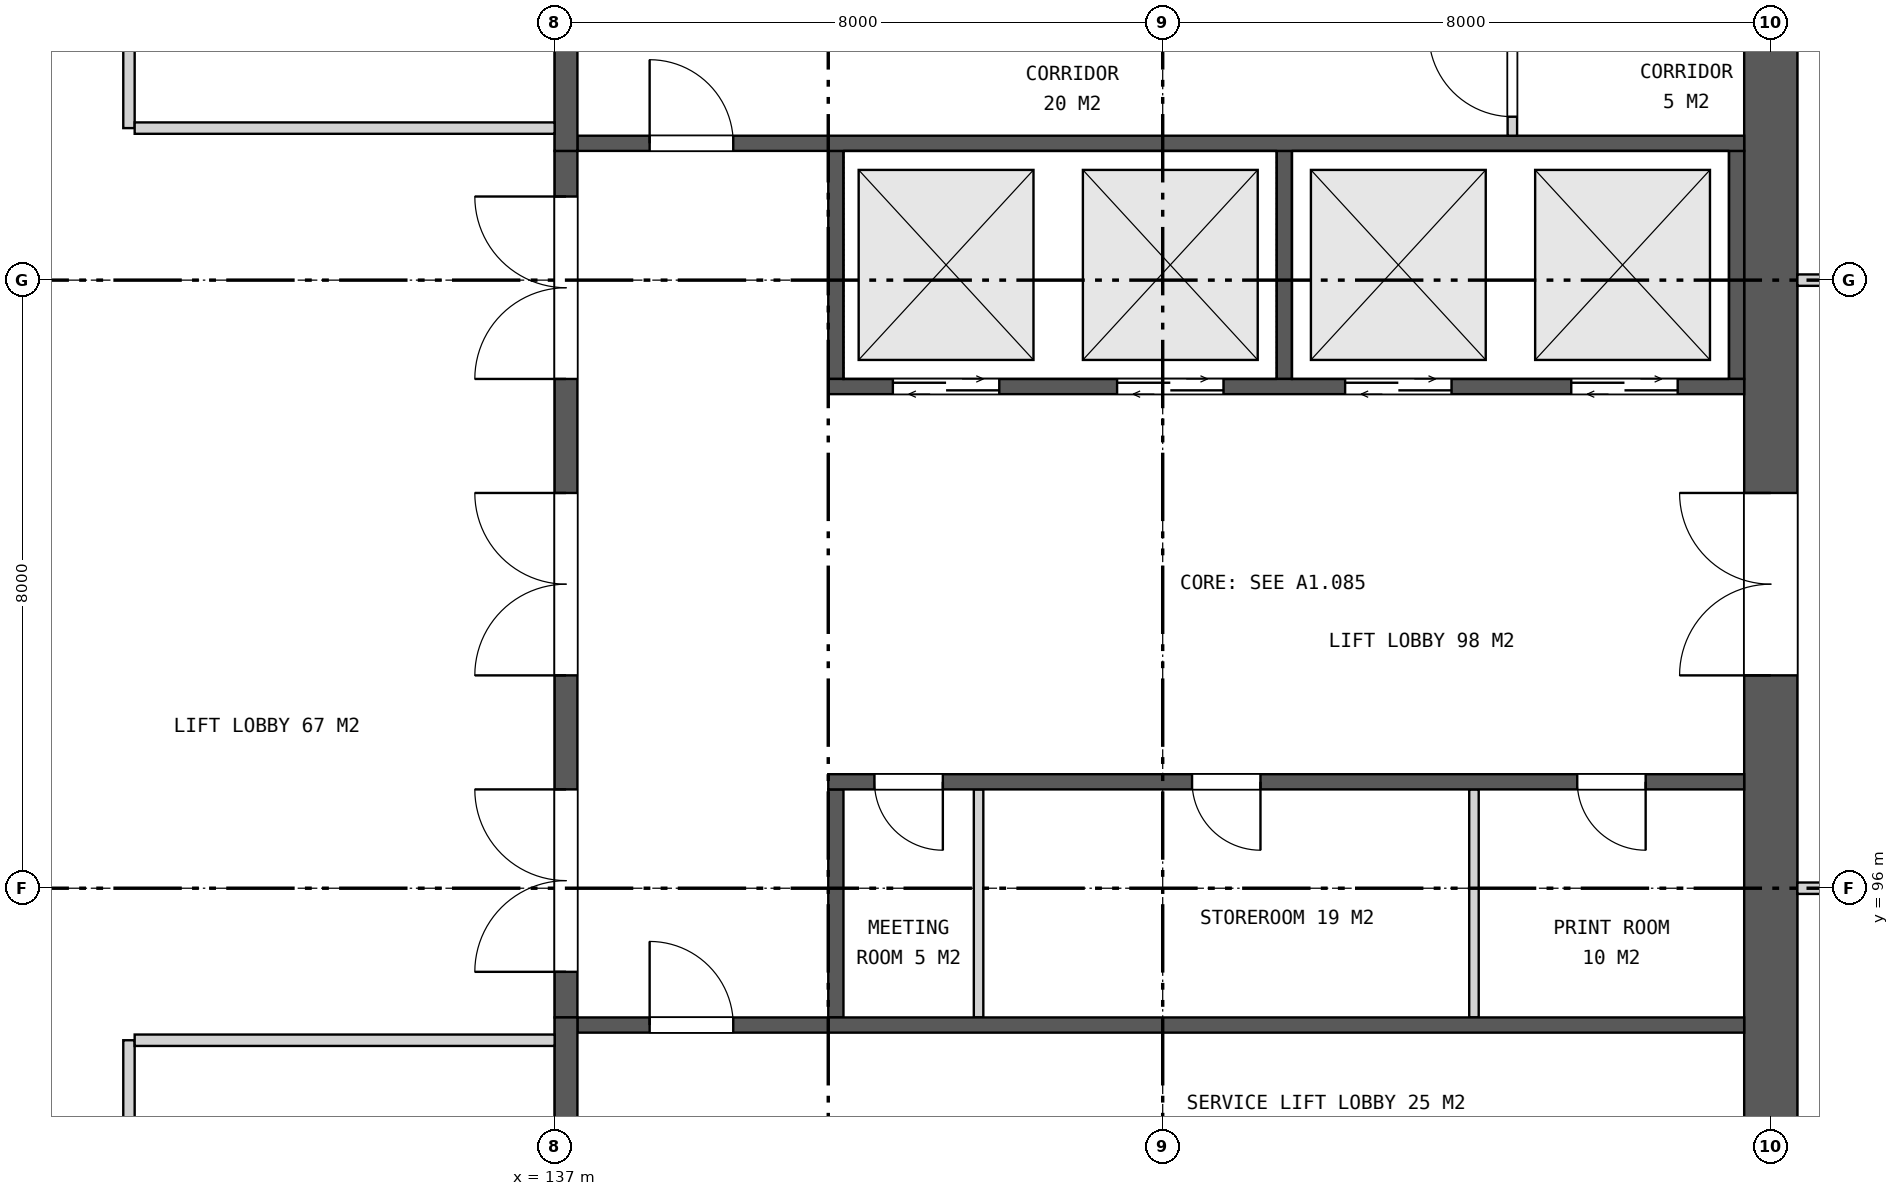
"""IFC4 building model, lengths in metres.
Left out: names, types, materials, properties, quantities, classifications, styles, units other than length and angle.
Written with IfcOpenShell. Run it as: python <this file> out.ifc"""

import sys

from ifc_helpers import new_model, si_unit, direction, frame, frame_2d, origin, place, context, subcontext, project, spatial, rectangle, extrude, element, fill, save


model = new_model("IFC4")
c1 = context("Model", 3, precision=1e-05, world=origin(), true_north=direction((0.0, 1.0)))
c2 = subcontext(c1, "Body", "Model", "MODEL_VIEW")
j1 = project(units=[si_unit("LENGTHUNIT", "METRE"), si_unit("PLANEANGLEUNIT", "RADIAN")], contexts=[c1])
p1 = place(None, origin())
s1 = spatial("IfcSite", under=j1, at=p1, CompositionType="ELEMENT")
p2 = place(p1, origin())
s2 = spatial("IfcBuilding", under=s1, at=p2, CompositionType="ELEMENT")
p3 = place(p2, frame((0.0, 0.0, 171.5)))
s3 = spatial("IfcBuildingStorey", under=s2, at=p3, CompositionType="ELEMENT", Elevation=171.5)
p4 = place(p3, frame((153.0, 88.35, 0.0), z_axis=(0.0, 0.0, 1.0), x_axis=(0.0, 1.0, 0.0)))
e1 = element("IfcWall", 1, at=p4, inside=s3, PredefinedType="SHEAR", context=c2, shape_type="SweptSolid", body=[
    extrude(rectangle(XDim=23.3, YDim=0.7, at=frame_2d((11.65, 0.0))), origin(), (0.0, 0.0, 1.0), 7.4),
])
p5 = place(p4, frame((10.45, 0.0, 0.0)))
e2 = element("IfcOpeningElement", 2, at=p5, cuts=e1, PredefinedType="OPENING", context=c2, shape_type="SweptSolid", body=[
    extrude(rectangle(XDim=2.4, YDim=2.4, at=frame_2d((1.2, 1.2))), frame((0.0, 0.36, 0.0), z_axis=(0.0, -1.0, 0.0), x_axis=(1.0, 0.0, 0.0)), (0.0, 0.0, 1.0), 0.72),
])
p6 = place(p3, frame((137.15, 94.3, 0.0), z_axis=(0.0, 0.0, 1.0), x_axis=(0.0, 1.0, 0.0)))
e3 = element("IfcWall", 3, at=p6, inside=s3, PredefinedType="SHEAR", context=c2, shape_type="SweptSolid", body=[
    extrude(rectangle(XDim=11.4, YDim=0.3, at=frame_2d((5.7, 0.0))), origin(), (0.0, 0.0, 1.0), 7.4),
])
p7 = place(p6, frame((0.6, 0.0, 0.0)))
e4 = element("IfcOpeningElement", 4, at=p7, cuts=e3, PredefinedType="OPENING", context=c2, shape_type="SweptSolid", body=[
    extrude(rectangle(XDim=2.4, YDim=2.4, at=frame_2d((1.2, 1.2))), frame((0.0, 0.16, 0.0), z_axis=(0.0, -1.0, 0.0), x_axis=(1.0, 0.0, 0.0)), (0.0, 0.0, 1.0), 0.32),
])
p8 = place(p6, frame((4.5, 0.0, 0.0)))
e5 = element("IfcOpeningElement", 5, at=p8, cuts=e3, PredefinedType="OPENING", context=c2, shape_type="SweptSolid", body=[
    extrude(rectangle(XDim=2.4, YDim=2.4, at=frame_2d((1.2, 1.2))), frame((0.0, 0.16, 0.0), z_axis=(0.0, -1.0, 0.0), x_axis=(1.0, 0.0, 0.0)), (0.0, 0.0, 1.0), 0.32),
])
p9 = place(p6, frame((8.4, 0.0, 0.0)))
e6 = element("IfcOpeningElement", 6, at=p9, cuts=e3, PredefinedType="OPENING", context=c2, shape_type="SweptSolid", body=[
    extrude(rectangle(XDim=2.4, YDim=2.4, at=frame_2d((1.2, 1.2))), frame((0.0, 0.16, 0.0), z_axis=(0.0, -1.0, 0.0), x_axis=(1.0, 0.0, 0.0)), (0.0, 0.0, 1.0), 0.32),
])
for number, where, z_axis, x_axis in (
    (7, (140.7, 102.7, 0.0), (0.0, 0.0, 1.0), (0.0, 1.0, 0.0)),
    (8, (146.6, 102.7, 0.0), (0.0, 0.0, 1.0), (0.0, 1.0, 0.0)),
    (9, (152.55, 102.7, 0.0), (0.0, 0.0, 1.0), (0.0, 1.0, 0.0)),
):
    element("IfcWall", number, at=place(p3, frame(where, z_axis=z_axis, x_axis=x_axis)), inside=s3, PredefinedType="SHEAR", context=c2, shape_type="SweptSolid", body=[
        extrude(rectangle(XDim=3.0, YDim=0.2, at=frame_2d((1.5, 0.0))), origin(), (0.0, 0.0, 1.0), 7.4),
    ])
p10 = place(p3, frame((140.6, 102.6, 0.0), z_axis=(0.0, 0.0, 1.0), x_axis=(1.0, 0.0, 0.0)))
e10 = element("IfcWall", 10, at=p10, inside=s3, PredefinedType="SHEAR", context=c2, shape_type="SweptSolid", body=[
    extrude(rectangle(XDim=12.05, YDim=0.2, at=frame_2d((6.025, 0.0))), origin(), (0.0, 0.0, 1.0), 7.4),
])
p11 = place(p10, frame((0.85, 0.0, 0.0)))
e11 = element("IfcOpeningElement", 11, at=p11, cuts=e10, PredefinedType="OPENING", context=c2, shape_type="SweptSolid", body=[
    extrude(rectangle(XDim=1.4, YDim=2.1, at=frame_2d((0.7, 1.05))), frame((0.0, 0.11, 0.0), z_axis=(0.0, -1.0, 0.0), x_axis=(1.0, 0.0, 0.0)), (0.0, 0.0, 1.0), 0.22),
])
p12 = place(p10, frame((3.8, 0.0, 0.0)))
e12 = element("IfcOpeningElement", 12, at=p12, cuts=e10, PredefinedType="OPENING", context=c2, shape_type="SweptSolid", body=[
    extrude(rectangle(XDim=1.4, YDim=2.1, at=frame_2d((0.7, 1.05))), frame((0.0, 0.11, 0.0), z_axis=(0.0, -1.0, 0.0), x_axis=(1.0, 0.0, 0.0)), (0.0, 0.0, 1.0), 0.22),
])
p13 = place(p10, frame((6.8, 0.0, 0.0)))
e13 = element("IfcOpeningElement", 13, at=p13, cuts=e10, PredefinedType="OPENING", context=c2, shape_type="SweptSolid", body=[
    extrude(rectangle(XDim=1.4, YDim=2.1, at=frame_2d((0.7, 1.05))), frame((0.0, 0.11, 0.0), z_axis=(0.0, -1.0, 0.0), x_axis=(1.0, 0.0, 0.0)), (0.0, 0.0, 1.0), 0.22),
])
p14 = place(p10, frame((9.775, 0.0, 0.0)))
e14 = element("IfcOpeningElement", 14, at=p14, cuts=e10, PredefinedType="OPENING", context=c2, shape_type="SweptSolid", body=[
    extrude(rectangle(XDim=1.4, YDim=2.1, at=frame_2d((0.7, 1.05))), frame((0.0, 0.11, 0.0), z_axis=(0.0, -1.0, 0.0), x_axis=(1.0, 0.0, 0.0)), (0.0, 0.0, 1.0), 0.22),
])
p15 = place(p3, frame((140.7, 94.3, 0.0), z_axis=(0.0, 0.0, 1.0), x_axis=(0.0, 1.0, 0.0)))
e15 = element("IfcWall", 15, at=p15, inside=s3, PredefinedType="SHEAR", context=c2, shape_type="SweptSolid", body=[
    extrude(rectangle(XDim=3.0, YDim=0.2, at=frame_2d((1.5, 0.0))), origin(), (0.0, 0.0, 1.0), 7.4),
])
for number, where, z_axis, x_axis in (
    (16, (142.577, 94.3, 0.0), (0.0, 0.0, 1.0), (0.0, 1.0, 0.0)),
    (17, (149.095, 94.3, 0.0), (0.0, 0.0, 1.0), (0.0, 1.0, 0.0)),
):
    element("IfcWall", number, at=place(p3, frame(where, z_axis=z_axis, x_axis=x_axis)), inside=s3, PredefinedType="PARTITIONING", context=c2, shape_type="SweptSolid", body=[
        extrude(rectangle(XDim=3.0, YDim=0.125, at=frame_2d((1.5, 0.0))), origin(), (0.0, 0.0, 1.0), 7.4),
    ])
p16 = place(p3, frame((140.6, 97.4, 0.0), z_axis=(0.0, 0.0, 1.0), x_axis=(1.0, 0.0, 0.0)))
e18 = element("IfcWall", 18, at=p16, inside=s3, PredefinedType="SHEAR", context=c2, shape_type="SweptSolid", body=[
    extrude(rectangle(XDim=12.05, YDim=0.2, at=frame_2d((6.025, 0.0))), origin(), (0.0, 0.0, 1.0), 7.4),
])
p17 = place(p16, frame((0.607, 0.0, 0.0)))
e19 = element("IfcOpeningElement", 19, at=p17, cuts=e18, PredefinedType="OPENING", context=c2, shape_type="SweptSolid", body=[
    extrude(rectangle(XDim=0.9, YDim=2.1, at=frame_2d((0.45, 1.05))), frame((0.0, 0.11, 0.0), z_axis=(0.0, -1.0, 0.0), x_axis=(1.0, 0.0, 0.0)), (0.0, 0.0, 1.0), 0.22),
])
p18 = place(p16, frame((4.786, 0.0, 0.0)))
e20 = element("IfcOpeningElement", 20, at=p18, cuts=e18, PredefinedType="OPENING", context=c2, shape_type="SweptSolid", body=[
    extrude(rectangle(XDim=0.9, YDim=2.1, at=frame_2d((0.45, 1.05))), frame((0.0, 0.11, 0.0), z_axis=(0.0, -1.0, 0.0), x_axis=(1.0, 0.0, 0.0)), (0.0, 0.0, 1.0), 0.22),
])
p19 = place(p16, frame((9.854, 0.0, 0.0)))
e21 = element("IfcOpeningElement", 21, at=p19, cuts=e18, PredefinedType="OPENING", context=c2, shape_type="SweptSolid", body=[
    extrude(rectangle(XDim=0.9, YDim=2.1, at=frame_2d((0.45, 1.05))), frame((0.0, 0.11, 0.0), z_axis=(0.0, -1.0, 0.0), x_axis=(1.0, 0.0, 0.0)), (0.0, 0.0, 1.0), 0.22),
])
p20 = place(p3, frame((137.3, 105.8, 0.0), z_axis=(0.0, 0.0, 1.0), x_axis=(1.0, 0.0, 0.0)))
e22 = element("IfcWall", 22, at=p20, inside=s3, PredefinedType="SHEAR", context=c2, shape_type="SweptSolid", body=[
    extrude(rectangle(XDim=15.35, YDim=0.2, at=frame_2d((7.675, 0.0))), origin(), (0.0, 0.0, 1.0), 7.4),
])
p21 = place(p20, frame((0.95, 0.0, 0.0)))
e23 = element("IfcOpeningElement", 23, at=p21, cuts=e22, PredefinedType="OPENING", context=c2, shape_type="SweptSolid", body=[
    extrude(rectangle(XDim=1.1, YDim=2.1, at=frame_2d((0.55, 1.05))), frame((0.0, 0.11, 0.0), z_axis=(0.0, -1.0, 0.0), x_axis=(1.0, 0.0, 0.0)), (0.0, 0.0, 1.0), 0.22),
])
p22 = place(p3, frame((137.15, 105.7, 0.0), z_axis=(0.0, 0.0, 1.0), x_axis=(0.0, 1.0, 0.0)))
e24 = element("IfcWall", 24, at=p22, inside=s3, PredefinedType="SHEAR", context=c2, shape_type="SweptSolid", body=[
    extrude(rectangle(XDim=5.95, YDim=0.3, at=frame_2d((2.975, 0.0))), origin(), (0.0, 0.0, 1.0), 7.4),
])
p23 = place(p3, frame((149.6, 105.9, 0.0), z_axis=(0.0, 0.0, 1.0), x_axis=(0.0, 1.0, 0.0)))
e25 = element("IfcWall", 25, at=p23, inside=s3, PredefinedType="PARTITIONING", context=c2, shape_type="SweptSolid", body=[
    extrude(rectangle(XDim=1.6, YDim=0.125, at=frame_2d((0.8, 0.0))), origin(), (0.0, 0.0, 1.0), 7.4),
])
p24 = place(p23, frame((0.25, 0.0, 0.0)))
e26 = element("IfcOpeningElement", 26, at=p24, cuts=e25, PredefinedType="OPENING", context=c2, shape_type="SweptSolid", body=[
    extrude(rectangle(XDim=1.1, YDim=2.1, at=frame_2d((0.55, 1.05))), frame((0.0, 0.073, 0.0), z_axis=(0.0, -1.0, 0.0), x_axis=(1.0, 0.0, 0.0)), (0.0, 0.0, 1.0), 0.145),
])
p25 = place(p3, frame((137.3, 94.2, 0.0), z_axis=(0.0, 0.0, 1.0), x_axis=(1.0, 0.0, 0.0)))
e27 = element("IfcWall", 27, at=p25, inside=s3, PredefinedType="SHEAR", context=c2, shape_type="SweptSolid", body=[
    extrude(rectangle(XDim=15.35, YDim=0.2, at=frame_2d((7.675, 0.0))), origin(), (0.0, 0.0, 1.0), 7.4),
])
p26 = place(p25, frame((0.95, 0.0, 0.0)))
e28 = element("IfcOpeningElement", 28, at=p26, cuts=e27, PredefinedType="OPENING", context=c2, shape_type="SweptSolid", body=[
    extrude(rectangle(XDim=1.1, YDim=2.1, at=frame_2d((0.55, 1.05))), frame((0.0, 0.11, 0.0), z_axis=(0.0, -1.0, 0.0), x_axis=(1.0, 0.0, 0.0)), (0.0, 0.0, 1.0), 0.22),
])
p27 = place(p3, frame((137.15, 88.35, 0.0), z_axis=(0.0, 0.0, 1.0), x_axis=(0.0, 1.0, 0.0)))
e29 = element("IfcWall", 29, at=p27, inside=s3, PredefinedType="SHEAR", context=c2, shape_type="SweptSolid", body=[
    extrude(rectangle(XDim=5.95, YDim=0.3, at=frame_2d((2.975, 0.0))), origin(), (0.0, 0.0, 1.0), 7.4),
])
p28 = place(p3, frame((131.4, 88.075, 0.0), z_axis=(0.0, 0.0, 1.0), x_axis=(0.0, 1.0, 0.0)))
e30 = element("IfcWall", 30, at=p28, inside=s3, PredefinedType="PARTITIONING", context=c2, shape_type="SweptSolid", body=[
    extrude(rectangle(XDim=5.925, YDim=0.15, at=frame_2d((2.962, 0.0))), origin(), (0.0, 0.0, 1.0), 6.64),
])
p29 = place(p28, frame((2.45, 0.0, 0.0)))
e31 = element("IfcOpeningElement", 31, at=p29, cuts=e30, PredefinedType="OPENING", context=c2, shape_type="SweptSolid", body=[
    extrude(rectangle(XDim=1.0, YDim=2.1, at=frame_2d((0.5, 1.05))), frame((0.0, 0.085, 0.0), z_axis=(0.0, -1.0, 0.0), x_axis=(1.0, 0.0, 0.0)), (0.0, 0.0, 1.0), 0.17),
])
p30 = place(p3, frame((131.4, 106.0, 0.0), z_axis=(0.0, 0.0, 1.0), x_axis=(0.0, 1.0, 0.0)))
e32 = element("IfcWall", 32, at=p30, inside=s3, PredefinedType="PARTITIONING", context=c2, shape_type="SweptSolid", body=[
    extrude(rectangle(XDim=5.925, YDim=0.15, at=frame_2d((2.962, 0.0))), origin(), (0.0, 0.0, 1.0), 6.64),
])
p31 = place(p30, frame((2.45, 0.0, 0.0)))
e33 = element("IfcOpeningElement", 33, at=p31, cuts=e32, PredefinedType="OPENING", context=c2, shape_type="SweptSolid", body=[
    extrude(rectangle(XDim=1.0, YDim=2.1, at=frame_2d((0.5, 1.05))), frame((0.0, 0.085, 0.0), z_axis=(0.0, -1.0, 0.0), x_axis=(1.0, 0.0, 0.0)), (0.0, 0.0, 1.0), 0.17),
])
p32 = place(p3, frame((131.475, 94.0, 0.0), z_axis=(0.0, 0.0, 1.0), x_axis=(1.0, 0.0, 0.0)))
e34 = element("IfcWall", 34, at=p32, inside=s3, PredefinedType="PARTITIONING", context=c2, shape_type="SweptSolid", body=[
    extrude(rectangle(XDim=5.525, YDim=0.15, at=frame_2d((2.762, 0.0))), origin(), (0.0, 0.0, 1.0), 6.64),
])
p33 = place(p3, frame((153.35, 96.0, 0.0), z_axis=(0.0, 0.0, 1.0), x_axis=(1.0, 0.0, 0.0)))
e35 = element("IfcWall", 35, at=p33, inside=s3, PredefinedType="PARTITIONING", context=c2, shape_type="SweptSolid", body=[
    extrude(rectangle(XDim=8.02, YDim=0.15, at=frame_2d((4.01, 0.0))), origin(), (0.0, 0.0, 1.0), 6.64),
])
p34 = place(p33, frame((3.35, 0.0, 0.0)))
e36 = element("IfcOpeningElement", 36, at=p34, cuts=e35, PredefinedType="OPENING", context=c2, shape_type="SweptSolid", body=[
    extrude(rectangle(XDim=1.0, YDim=2.1, at=frame_2d((0.5, 1.05))), frame((0.0, 0.085, 0.0), z_axis=(0.0, -1.0, 0.0), x_axis=(1.0, 0.0, 0.0)), (0.0, 0.0, 1.0), 0.17),
])
p35 = place(p3, frame((153.35, 104.0, 0.0), z_axis=(0.0, 0.0, 1.0), x_axis=(1.0, 0.0, 0.0)))
e37 = element("IfcWall", 37, at=p35, inside=s3, PredefinedType="PARTITIONING", context=c2, shape_type="SweptSolid", body=[
    extrude(rectangle(XDim=8.02, YDim=0.15, at=frame_2d((4.01, 0.0))), origin(), (0.0, 0.0, 1.0), 6.64),
])
p36 = place(p35, frame((3.35, 0.0, 0.0)))
e38 = element("IfcOpeningElement", 38, at=p36, cuts=e37, PredefinedType="OPENING", context=c2, shape_type="SweptSolid", body=[
    extrude(rectangle(XDim=1.0, YDim=2.1, at=frame_2d((0.5, 1.05))), frame((0.0, 0.085, 0.0), z_axis=(0.0, -1.0, 0.0), x_axis=(1.0, 0.0, 0.0)), (0.0, 0.0, 1.0), 0.17),
])
p37 = place(p3, frame((131.475, 106.0, 0.0), z_axis=(0.0, 0.0, 1.0), x_axis=(1.0, 0.0, 0.0)))
e39 = element("IfcWall", 39, at=p37, inside=s3, PredefinedType="PARTITIONING", context=c2, shape_type="SweptSolid", body=[
    extrude(rectangle(XDim=5.525, YDim=0.15, at=frame_2d((2.762, 0.0))), origin(), (0.0, 0.0, 1.0), 6.64),
])
p38 = place(p5, origin())
e40 = element("IfcDoor", 40, at=p38, inside=s3, OperationType="DOUBLE_DOOR_SINGLE_SWING", PredefinedType="DOOR", context=c2, shape_type="SweptSolid", body=[
    extrude(rectangle(XDim=2.4, YDim=2.4, at=frame_2d((1.2, 1.2))), frame((0.0, 0.025, 0.0), z_axis=(0.0, -1.0, 0.0), x_axis=(1.0, 0.0, 0.0)), (0.0, 0.0, 1.0), 0.05),
])
fill(e2, e40)
p39 = place(p7, origin())
e41 = element("IfcDoor", 41, at=p39, inside=s3, OperationType="DOUBLE_DOOR_SINGLE_SWING", PredefinedType="DOOR", context=c2, shape_type="SweptSolid", body=[
    extrude(rectangle(XDim=2.4, YDim=2.4, at=frame_2d((1.2, 1.2))), frame((0.0, 0.025, 0.0), z_axis=(0.0, -1.0, 0.0), x_axis=(1.0, 0.0, 0.0)), (0.0, 0.0, 1.0), 0.05),
])
fill(e4, e41)
p40 = place(p8, origin())
e42 = element("IfcDoor", 42, at=p40, inside=s3, OperationType="DOUBLE_DOOR_SINGLE_SWING", PredefinedType="DOOR", context=c2, shape_type="SweptSolid", body=[
    extrude(rectangle(XDim=2.4, YDim=2.4, at=frame_2d((1.2, 1.2))), frame((0.0, 0.025, 0.0), z_axis=(0.0, -1.0, 0.0), x_axis=(1.0, 0.0, 0.0)), (0.0, 0.0, 1.0), 0.05),
])
fill(e5, e42)
p41 = place(p9, origin())
e43 = element("IfcDoor", 43, at=p41, inside=s3, OperationType="DOUBLE_DOOR_SINGLE_SWING", PredefinedType="DOOR", context=c2, shape_type="SweptSolid", body=[
    extrude(rectangle(XDim=2.4, YDim=2.4, at=frame_2d((1.2, 1.2))), frame((0.0, 0.025, 0.0), z_axis=(0.0, -1.0, 0.0), x_axis=(1.0, 0.0, 0.0)), (0.0, 0.0, 1.0), 0.05),
])
fill(e6, e43)
p42 = place(p11, origin())
e44 = element("IfcDoor", 44, at=p42, inside=s3, OperationType="DOUBLE_DOOR_SLIDING", PredefinedType="DOOR", context=c2, shape_type="SweptSolid", body=[
    extrude(rectangle(XDim=1.4, YDim=2.1, at=frame_2d((0.7, 1.05))), frame((0.0, 0.025, 0.0), z_axis=(0.0, -1.0, 0.0), x_axis=(1.0, 0.0, 0.0)), (0.0, 0.0, 1.0), 0.05),
])
fill(e11, e44)
p43 = place(p12, origin())
e45 = element("IfcDoor", 45, at=p43, inside=s3, OperationType="DOUBLE_DOOR_SLIDING", PredefinedType="DOOR", context=c2, shape_type="SweptSolid", body=[
    extrude(rectangle(XDim=1.4, YDim=2.1, at=frame_2d((0.7, 1.05))), frame((0.0, 0.025, 0.0), z_axis=(0.0, -1.0, 0.0), x_axis=(1.0, 0.0, 0.0)), (0.0, 0.0, 1.0), 0.05),
])
fill(e12, e45)
p44 = place(p13, origin())
e46 = element("IfcDoor", 46, at=p44, inside=s3, OperationType="DOUBLE_DOOR_SLIDING", PredefinedType="DOOR", context=c2, shape_type="SweptSolid", body=[
    extrude(rectangle(XDim=1.4, YDim=2.1, at=frame_2d((0.7, 1.05))), frame((0.0, 0.025, 0.0), z_axis=(0.0, -1.0, 0.0), x_axis=(1.0, 0.0, 0.0)), (0.0, 0.0, 1.0), 0.05),
])
fill(e13, e46)
p45 = place(p14, origin())
e47 = element("IfcDoor", 47, at=p45, inside=s3, OperationType="DOUBLE_DOOR_SLIDING", PredefinedType="DOOR", context=c2, shape_type="SweptSolid", body=[
    extrude(rectangle(XDim=1.4, YDim=2.1, at=frame_2d((0.7, 1.05))), frame((0.0, 0.025, 0.0), z_axis=(0.0, -1.0, 0.0), x_axis=(1.0, 0.0, 0.0)), (0.0, 0.0, 1.0), 0.05),
])
fill(e14, e47)
p46 = place(p17, frame((0.9, 0.0, 0.0), z_axis=(0.0, 0.0, 1.0), x_axis=(-1.0, 0.0, 0.0)))
e48 = element("IfcDoor", 48, at=p46, inside=s3, OperationType="SINGLE_SWING_LEFT", PredefinedType="DOOR", context=c2, shape_type="SweptSolid", body=[
    extrude(rectangle(XDim=0.9, YDim=2.1, at=frame_2d((0.45, 1.05))), frame((0.0, 0.025, 0.0), z_axis=(0.0, -1.0, 0.0), x_axis=(1.0, 0.0, 0.0)), (0.0, 0.0, 1.0), 0.05),
])
fill(e19, e48)
p47 = place(p18, frame((0.9, 0.0, 0.0), z_axis=(0.0, 0.0, 1.0), x_axis=(-1.0, 0.0, 0.0)))
e49 = element("IfcDoor", 49, at=p47, inside=s3, OperationType="SINGLE_SWING_LEFT", PredefinedType="DOOR", context=c2, shape_type="SweptSolid", body=[
    extrude(rectangle(XDim=0.9, YDim=2.1, at=frame_2d((0.45, 1.05))), frame((0.0, 0.025, 0.0), z_axis=(0.0, -1.0, 0.0), x_axis=(1.0, 0.0, 0.0)), (0.0, 0.0, 1.0), 0.05),
])
fill(e20, e49)
p48 = place(p19, frame((0.9, 0.0, 0.0), z_axis=(0.0, 0.0, 1.0), x_axis=(-1.0, 0.0, 0.0)))
e50 = element("IfcDoor", 50, at=p48, inside=s3, OperationType="SINGLE_SWING_LEFT", PredefinedType="DOOR", context=c2, shape_type="SweptSolid", body=[
    extrude(rectangle(XDim=0.9, YDim=2.1, at=frame_2d((0.45, 1.05))), frame((0.0, 0.025, 0.0), z_axis=(0.0, -1.0, 0.0), x_axis=(1.0, 0.0, 0.0)), (0.0, 0.0, 1.0), 0.05),
])
fill(e21, e50)
p49 = place(p21, origin())
e51 = element("IfcDoor", 51, at=p49, inside=s3, OperationType="SINGLE_SWING_LEFT", PredefinedType="DOOR", context=c2, shape_type="SweptSolid", body=[
    extrude(rectangle(XDim=1.1, YDim=2.1, at=frame_2d((0.55, 1.05))), frame((0.0, 0.025, 0.0), z_axis=(0.0, -1.0, 0.0), x_axis=(1.0, 0.0, 0.0)), (0.0, 0.0, 1.0), 0.05),
])
fill(e23, e51)
p50 = place(p24, origin())
e52 = element("IfcDoor", 52, at=p50, inside=s3, OperationType="SINGLE_SWING_RIGHT", PredefinedType="DOOR", context=c2, shape_type="SweptSolid", body=[
    extrude(rectangle(XDim=1.1, YDim=2.1, at=frame_2d((0.55, 1.05))), frame((0.0, 0.025, 0.0), z_axis=(0.0, -1.0, 0.0), x_axis=(1.0, 0.0, 0.0)), (0.0, 0.0, 1.0), 0.05),
])
fill(e26, e52)
p51 = place(p26, origin())
e53 = element("IfcDoor", 53, at=p51, inside=s3, OperationType="SINGLE_SWING_LEFT", PredefinedType="DOOR", context=c2, shape_type="SweptSolid", body=[
    extrude(rectangle(XDim=1.1, YDim=2.1, at=frame_2d((0.55, 1.05))), frame((0.0, 0.025, 0.0), z_axis=(0.0, -1.0, 0.0), x_axis=(1.0, 0.0, 0.0)), (0.0, 0.0, 1.0), 0.05),
])
fill(e28, e53)
save(model, sys.argv[1])
